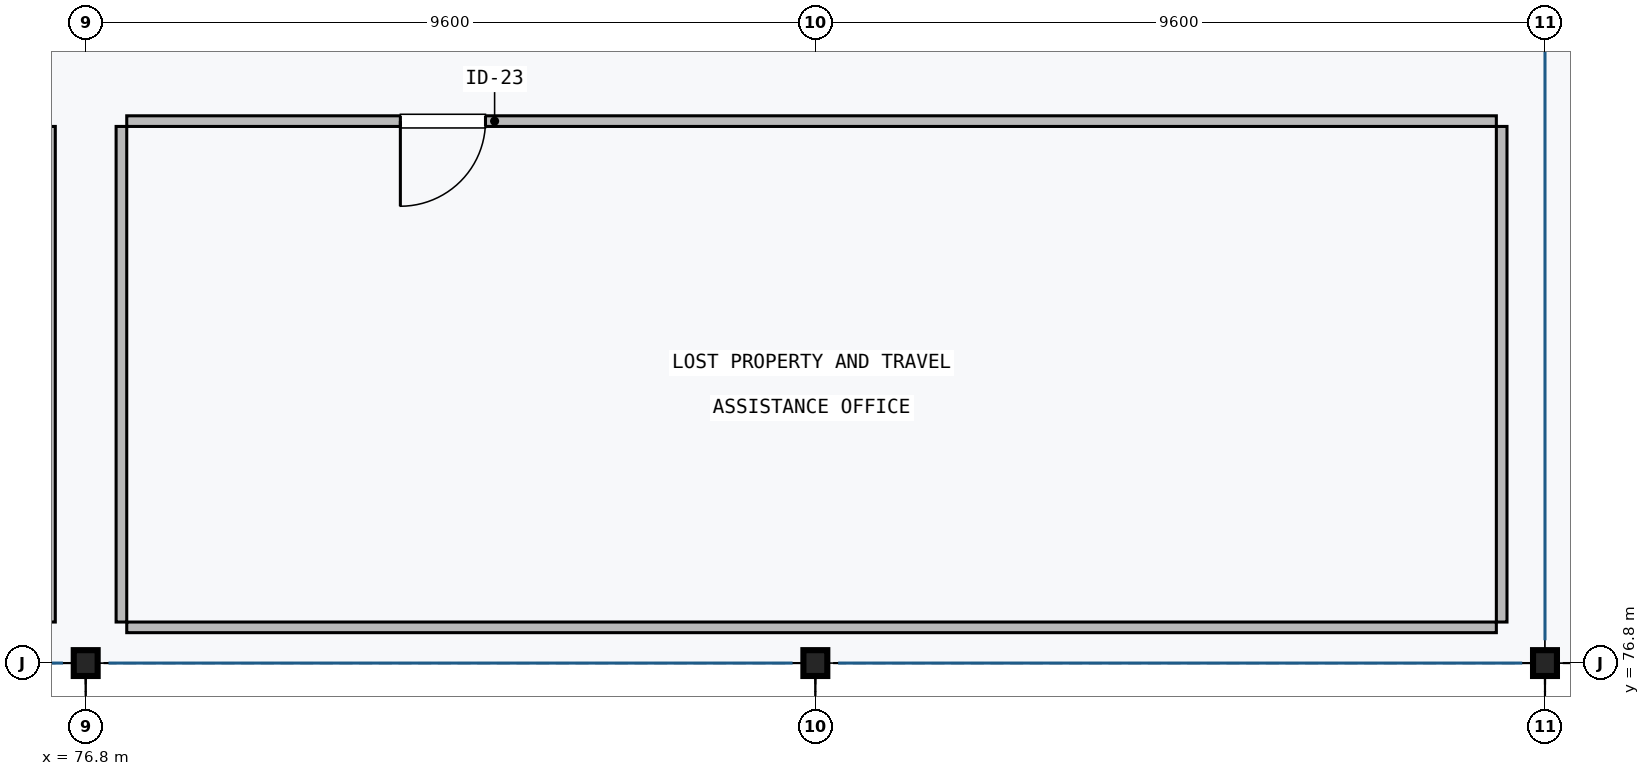
"""IFC4 building model, lengths in metres.
Left out: names, types, materials, properties, quantities, classifications, styles, units other than length and angle.
Written with IfcOpenShell. Run it as: python <this file> out.ifc"""

import sys

from ifc_helpers import new_model, si_unit, direction, frame, frame_2d, origin, origin_2d, place, context, subcontext, project, spatial, rectangle, i_section, extrude, element, fill, save


model = new_model("IFC4")
c1 = context("Model", 3, precision=1e-05, world=origin(), true_north=direction((0.0, 1.0)))
c2 = subcontext(c1, "Body", "Model", "MODEL_VIEW")
j1 = project(units=[si_unit("LENGTHUNIT", "METRE"), si_unit("PLANEANGLEUNIT", "RADIAN")], contexts=[c1])
p1 = place(None, origin())
s1 = spatial("IfcSite", under=j1, at=p1, CompositionType="ELEMENT")
p2 = place(p1, origin())
s2 = spatial("IfcBuilding", under=s1, at=p2, CompositionType="ELEMENT")
p3 = place(p2, frame((0.0, 0.0, 10.5)))
s3 = spatial("IfcBuildingStorey", under=s2, at=p3, CompositionType="ELEMENT", Elevation=10.5)
for number, where, z_axis, x_axis in (
    (1, (76.8, 76.8, 0.0), (0.0, 0.0, 1.0), (1.0, 0.0, 0.0)),
    (2, (86.4, 76.8, 0.0), (0.0, 0.0, 1.0), (1.0, 0.0, 0.0)),
    (3, (96.0, 76.8, 0.0), (0.0, 0.0, 1.0), (1.0, 0.0, 0.0)),
):
    element("IfcColumn", number, at=place(p3, frame(where, z_axis=z_axis, x_axis=x_axis)), inside=s3, PredefinedType="COLUMN", context=c2, shape_type="SweptSolid", body=[
        extrude(i_section(OverallWidth=0.314, OverallDepth=0.34, WebThickness=0.019, FlangeThickness=0.031, FilletRadius=0.015, at=origin_2d()), origin(), (0.0, 0.0, 1.0), 3.95),
    ])
p4 = place(p3, frame((76.33, 83.86, 0.0), z_axis=(0.0, 0.0, 1.0), x_axis=(0.0, -1.0, 0.0)))
e4 = element("IfcWall", 4, at=p4, inside=s3, PredefinedType="PARTITIONING", context=c2, shape_type="SweptSolid", body=[
    extrude(rectangle(XDim=6.52, YDim=0.14, at=frame_2d((3.26, 0.0))), origin(), (0.0, 0.0, 1.0), 3.59),
])
p5 = place(p3, frame((95.36, 77.27, 0.0), z_axis=(0.0, 0.0, 1.0), x_axis=(-1.0, 0.0, 0.0)))
e5 = element("IfcWall", 5, at=p5, inside=s3, PredefinedType="PARTITIONING", context=c2, shape_type="SweptSolid", body=[
    extrude(rectangle(XDim=18.02, YDim=0.14, at=frame_2d((9.01, 0.0))), origin(), (0.0, 0.0, 1.0), 3.483),
])
p6 = place(p3, frame((77.34, 83.93, 0.0), z_axis=(0.0, 0.0, 1.0), x_axis=(1.0, 0.0, 0.0)))
e6 = element("IfcWall", 6, at=p6, inside=s3, PredefinedType="PARTITIONING", context=c2, shape_type="SweptSolid", body=[
    extrude(rectangle(XDim=18.02, YDim=0.14, at=frame_2d((9.01, 0.0))), origin(), (0.0, 0.0, 1.0), 3.483),
])
p7 = place(p6, frame((3.6, 0.0, 0.0)))
e7 = element("IfcOpeningElement", 7, at=p7, cuts=e6, PredefinedType="OPENING", context=c2, shape_type="SweptSolid", body=[
    extrude(rectangle(XDim=1.12, YDim=2.2, at=frame_2d((0.56, 1.1))), frame((0.0, 0.08, 0.0), z_axis=(0.0, -1.0, 0.0), x_axis=(1.0, 0.0, 0.0)), (0.0, 0.0, 1.0), 0.16),
])
for number, where, z_axis, x_axis in (
    (8, (77.27, 77.34, 0.0), (0.0, 0.0, 1.0), (0.0, 1.0, 0.0)),
    (9, (95.43, 83.86, 0.0), (0.0, 0.0, 1.0), (0.0, -1.0, 0.0)),
):
    element("IfcWall", number, at=place(p3, frame(where, z_axis=z_axis, x_axis=x_axis)), inside=s3, PredefinedType="PARTITIONING", context=c2, shape_type="SweptSolid", body=[
        extrude(rectangle(XDim=6.52, YDim=0.14, at=frame_2d((3.26, 0.0))), origin(), (0.0, 0.0, 1.0), 3.59),
    ])
p8 = place(p7, frame((1.12, 0.0, 0.0), z_axis=(0.0, 0.0, 1.0), x_axis=(-1.0, 0.0, 0.0)))
e10 = element("IfcDoor", 10, at=p8, inside=s3, OperationType="SINGLE_SWING_LEFT", PredefinedType="DOOR", context=c2, shape_type="SweptSolid", body=[
    extrude(rectangle(XDim=1.12, YDim=2.2, at=frame_2d((0.56, 1.1))), frame((0.0, 0.025, 0.0), z_axis=(0.0, -1.0, 0.0), x_axis=(1.0, 0.0, 0.0)), (0.0, 0.0, 1.0), 0.05),
])
fill(e7, e10)
save(model, sys.argv[1])
